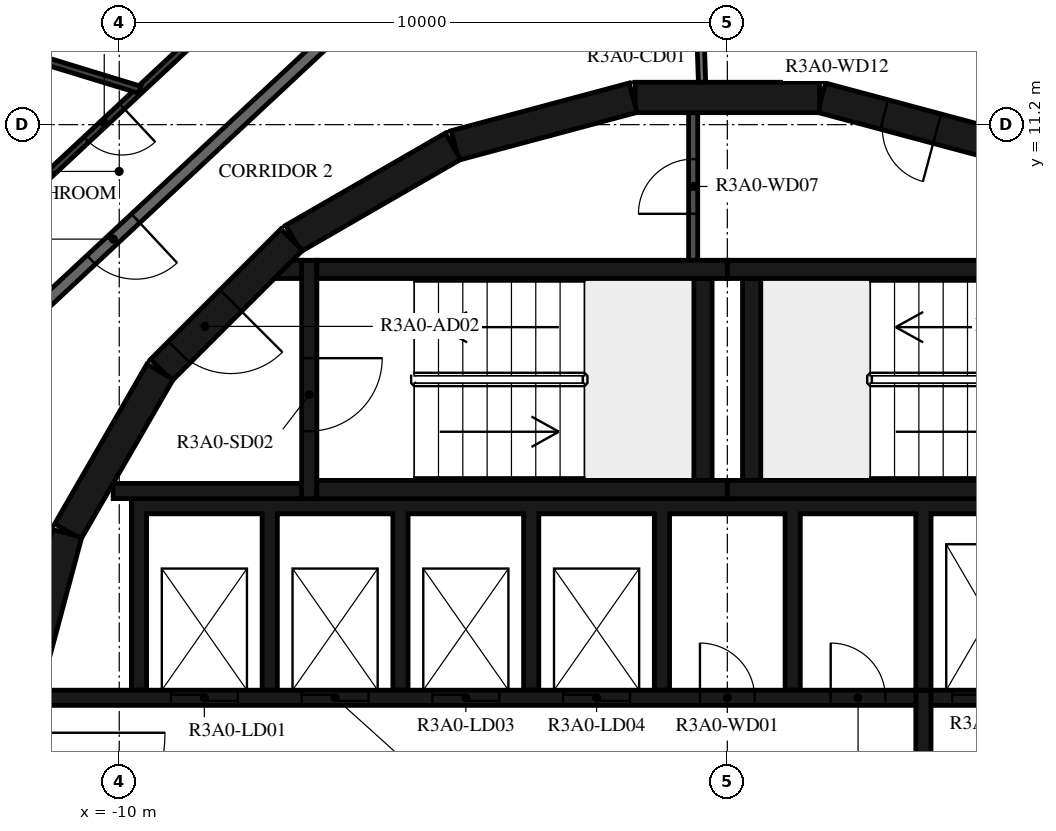
"""IFC4 building model, lengths in metres.
Left out: names, types, materials, properties, quantities, classifications, styles, units other than length and angle.
Written with IfcOpenShell. Run it as: python <this file> out.ifc"""

import sys

from ifc_helpers import new_model, si_unit, direction, frame, frame_2d, origin, place, context, subcontext, project, spatial, polyline, rectangle, outline, extrude, element, fill, save


model = new_model("IFC4")
c1 = context("Model", 3, precision=1e-05, world=origin(), true_north=direction((0.0, 1.0)))
c2 = subcontext(c1, "Body", "Model", "MODEL_VIEW")
j1 = project(units=[si_unit("LENGTHUNIT", "METRE"), si_unit("PLANEANGLEUNIT", "RADIAN")], contexts=[c1])
p1 = place(None, origin())
s1 = spatial("IfcSite", under=j1, at=p1, CompositionType="ELEMENT")
p2 = place(p1, origin())
s2 = spatial("IfcBuilding", under=s1, at=p2, CompositionType="ELEMENT")
p3 = place(p2, frame((0.0, 0.0, 120.4)))
s3 = spatial("IfcBuildingStorey", under=s2, at=p3, CompositionType="ELEMENT", Elevation=120.4)
p4 = place(p3, frame((4.479, 10.858, 0.0), z_axis=(0.0, 0.0, 1.0), x_axis=(-0.965948410781, 0.258734743916, 0.0)))
e1 = element("IfcWall", 1, at=p4, inside=s3, PredefinedType="SHEAR", context=c2, shape_type="SweptSolid", body=[
    extrude(rectangle(XDim=3.033, YDim=0.5, at=frame_2d((1.516, 0.0))), origin(), (0.0, 0.0, 1.0), 3.12),
])
p5 = place(p4, frame((1.066, 0.0, 0.0)))
e2 = element("IfcOpeningElement", 2, at=p5, cuts=e1, PredefinedType="OPENING", context=c2, shape_type="SweptSolid", body=[
    extrude(rectangle(XDim=0.9, YDim=2.1, at=frame_2d((0.45, 1.05))), frame((0.0, 0.26, 0.0), z_axis=(0.0, -1.0, 0.0), x_axis=(1.0, 0.0, 0.0)), (0.0, 0.0, 1.0), 0.52),
])
for number, where, z_axis, x_axis in (
    (3, (1.516, 11.647, 0.0), (0.0, 0.0, 1.0), (-1.0, 0.0, 0.0)),
    (4, (-1.55, 11.643, 0.0), (0.0, 0.0, 1.0), (-0.966, -0.259, 0.0)),
    (5, (-4.51, 10.845, 0.0), (0.0, 0.0, 1.0), (-0.866, -0.5, 0.0)),
):
    element("IfcWall", number, at=place(p3, frame(where, z_axis=z_axis, x_axis=x_axis)), inside=s3, PredefinedType="SHEAR", context=c2, shape_type="SweptSolid", body=[
        extrude(rectangle(XDim=3.033, YDim=0.5, at=frame_2d((1.516, 0.0))), origin(), (0.0, 0.0, 1.0), 3.12),
    ])
p6 = place(p3, frame((-7.164, 9.308, 0.0), z_axis=(0.0, 0.0, 1.0), x_axis=(-0.707106781187, -0.707106781187, 0.0)))
e6 = element("IfcWall", 6, at=p6, inside=s3, PredefinedType="SHEAR", context=c2, shape_type="SweptSolid", body=[
    extrude(rectangle(XDim=3.032, YDim=0.5, at=frame_2d((1.516, 0.0))), origin(), (0.0, 0.0, 1.0), 3.12),
])
p7 = place(p6, frame((1.416, 0.0, 0.0)))
e7 = element("IfcOpeningElement", 7, at=p7, cuts=e6, PredefinedType="OPENING", context=c2, shape_type="SweptSolid", body=[
    extrude(rectangle(XDim=1.2, YDim=2.1, at=frame_2d((0.6, 1.05))), frame((0.0, 0.26, 0.0), z_axis=(0.0, -1.0, 0.0), x_axis=(1.0, 0.0, 0.0)), (0.0, 0.0, 1.0), 0.52),
])
for number, where, z_axis, x_axis in (
    (8, (-9.329, 7.137, 0.0), (0.0, 0.0, 1.0), (-0.5, -0.866, 0.0)),
    (9, (-10.858, 4.479, 0.0), (0.0, 0.0, 1.0), (-0.259, -0.966, 0.0)),
):
    element("IfcWall", number, at=place(p3, frame(where, z_axis=z_axis, x_axis=x_axis)), inside=s3, PredefinedType="SHEAR", context=c2, shape_type="SweptSolid", body=[
        extrude(rectangle(XDim=3.033, YDim=0.5, at=frame_2d((1.516, 0.0))), origin(), (0.0, 0.0, 1.0), 3.12),
    ])
for number, where, z_axis, x_axis in (
    (10, (0.0, 5.2, 0.0), (0.0, 0.0, 1.0), (1.0, 0.0, 0.0)),
    (11, (0.0, 8.82, 0.0), (0.0, 0.0, 1.0), (1.0, 0.0, 0.0)),
):
    element("IfcWall", number, at=place(p3, frame(where, z_axis=z_axis, x_axis=x_axis)), inside=s3, PredefinedType="SHEAR", context=c2, shape_type="SweptSolid", body=[
        extrude(rectangle(XDim=6.75, YDim=0.3, at=frame_2d((3.375, 0.0))), origin(), (0.0, 0.0, 1.0), 3.12),
    ])
p8 = place(p3, frame((0.4, 5.35, 0.0), z_axis=(0.0, 0.0, 1.0), x_axis=(0.0, 1.0, 0.0)))
e12 = element("IfcWall", 12, at=p8, inside=s3, PredefinedType="SHEAR", context=c2, shape_type="SweptSolid", body=[
    extrude(rectangle(XDim=3.32, YDim=0.3, at=frame_2d((1.66, 0.0))), origin(), (0.0, 0.0, 1.0), 3.12),
])
for number, where, z_axis, x_axis in (
    (13, (-6.75, 5.2, 0.0), (0.0, 0.0, 1.0), (1.0, 0.0, 0.0)),
    (14, (-6.75, 8.82, 0.0), (0.0, 0.0, 1.0), (1.0, 0.0, 0.0)),
):
    element("IfcWall", number, at=place(p3, frame(where, z_axis=z_axis, x_axis=x_axis)), inside=s3, PredefinedType="SHEAR", context=c2, shape_type="SweptSolid", body=[
        extrude(rectangle(XDim=6.75, YDim=0.3, at=frame_2d((3.375, 0.0))), origin(), (0.0, 0.0, 1.0), 3.12),
    ])
p9 = place(p3, frame((-0.4, 5.35, 0.0), z_axis=(0.0, 0.0, 1.0), x_axis=(0.0, 1.0, 0.0)))
e15 = element("IfcWall", 15, at=p9, inside=s3, PredefinedType="SHEAR", context=c2, shape_type="SweptSolid", body=[
    extrude(rectangle(XDim=3.32, YDim=0.3, at=frame_2d((1.66, 0.0))), origin(), (0.0, 0.0, 1.0), 3.12),
])
p10 = place(p3, frame((-6.875, 8.97, 0.0), z_axis=(0.0, 0.0, 1.0), x_axis=(0.0, -1.0, 0.0)))
e16 = element("IfcWall", 16, at=p10, inside=s3, PredefinedType="SHEAR", context=c2, shape_type="SweptSolid", body=[
    extrude(rectangle(XDim=3.92, YDim=0.25, at=frame_2d((1.96, 0.0))), origin(), (0.0, 0.0, 1.0), 3.12),
])
p11 = place(p10, frame((1.61, 0.0, 0.0)))
e17 = element("IfcOpeningElement", 17, at=p11, cuts=e16, PredefinedType="OPENING", context=c2, shape_type="SweptSolid", body=[
    extrude(rectangle(XDim=1.2, YDim=2.1, at=frame_2d((0.6, 1.05))), frame((0.0, 0.135, 0.0), z_axis=(0.0, -1.0, 0.0), x_axis=(1.0, 0.0, 0.0)), (0.0, 0.0, 1.0), 0.27),
])
p12 = place(p3, frame((-7.0, 5.175, 0.0), z_axis=(0.0, 0.0, 1.0), x_axis=(-1.0, 0.0, 0.0)))
e18 = element("IfcWall", 18, at=p12, inside=s3, PredefinedType="SHEAR", context=c2, shape_type="SweptSolid", body=[
    extrude(rectangle(XDim=3.1, YDim=0.25, at=frame_2d((1.55, 0.0))), origin(), (0.0, 0.0, 1.0), 3.12),
])
p13 = place(p3, origin())
e19 = element("IfcWall", 19, at=p13, inside=s3, PredefinedType="SHEAR", context=c2, shape_type="SweptSolid", body=[
    extrude(outline(polyline([(-7.148, 8.97), (-7.0, 8.97), (-7.0, 8.67), (-7.448, 8.67), (-7.148, 8.97)])), origin(), (0.0, 0.0, 1.0), 3.12),
])
p14 = place(p3, origin())
e20 = element("IfcWall", 20, at=p14, inside=s3, PredefinedType="SHEAR", context=c2, shape_type="SweptSolid", body=[
    extrude(outline(polyline([(-9.55, 4.8), (-7.65, 4.8), (-7.65, 1.9), (-7.4, 1.9), (-7.4, 4.8), (-5.5, 4.8), (-5.5, 1.9), (-5.25, 1.9), (-5.25, 4.8), (-3.35, 4.8), (-3.35, 1.9), (-3.1, 1.9), (-3.1, 4.8), (-1.2, 4.8), (-1.2, 1.9), (-0.95, 1.9), (-0.95, 4.8), (0.95, 4.8), (0.95, 1.9), (1.2, 1.9), (1.2, 4.8), (3.1, 4.8), (3.1, 1.9), (3.35, 1.9), (3.35, 4.8), (5.25, 4.8), (5.25, 1.9), (5.5, 1.9), (5.5, 4.8), (7.4, 4.8), (7.4, 1.9), (7.65, 1.9), (7.65, 4.8), (9.55, 4.8), (9.55, 1.9), (9.8, 1.9), (9.8, 4.8), (9.8, 5.05), (-9.8, 5.05), (-9.8, 4.8), (-9.8, 1.9), (-9.55, 1.9), (-9.55, 4.8)])), origin(), (0.0, 0.0, 1.0), 3.12),
])
p15 = place(p3, frame((-11.28, 1.775, 0.0), z_axis=(0.0, 0.0, 1.0), x_axis=(1.0, 0.0, 0.0)))
e21 = element("IfcWall", 21, at=p15, inside=s3, PredefinedType="SHEAR", context=c2, shape_type="SweptSolid", body=[
    extrude(rectangle(XDim=14.38, YDim=0.25, at=frame_2d((7.19, 0.0))), origin(), (0.0, 0.0, 1.0), 3.12),
])
p16 = place(p15, frame((2.13, 0.0, 0.0)))
e22 = element("IfcOpeningElement", 22, at=p16, cuts=e21, PredefinedType="OPENING", context=c2, shape_type="SweptSolid", body=[
    extrude(rectangle(XDim=1.1, YDim=2.1, at=frame_2d((0.55, 1.05))), frame((0.0, 0.135, 0.0), z_axis=(0.0, -1.0, 0.0), x_axis=(1.0, 0.0, 0.0)), (0.0, 0.0, 1.0), 0.27),
])
p17 = place(p15, frame((4.28, 0.0, 0.0)))
e23 = element("IfcOpeningElement", 23, at=p17, cuts=e21, PredefinedType="OPENING", context=c2, shape_type="SweptSolid", body=[
    extrude(rectangle(XDim=1.1, YDim=2.1, at=frame_2d((0.55, 1.05))), frame((0.0, 0.135, 0.0), z_axis=(0.0, -1.0, 0.0), x_axis=(1.0, 0.0, 0.0)), (0.0, 0.0, 1.0), 0.27),
])
p18 = place(p15, frame((6.43, 0.0, 0.0)))
e24 = element("IfcOpeningElement", 24, at=p18, cuts=e21, PredefinedType="OPENING", context=c2, shape_type="SweptSolid", body=[
    extrude(rectangle(XDim=1.1, YDim=2.1, at=frame_2d((0.55, 1.05))), frame((0.0, 0.135, 0.0), z_axis=(0.0, -1.0, 0.0), x_axis=(1.0, 0.0, 0.0)), (0.0, 0.0, 1.0), 0.27),
])
p19 = place(p15, frame((8.58, 0.0, 0.0)))
e25 = element("IfcOpeningElement", 25, at=p19, cuts=e21, PredefinedType="OPENING", context=c2, shape_type="SweptSolid", body=[
    extrude(rectangle(XDim=1.1, YDim=2.1, at=frame_2d((0.55, 1.05))), frame((0.0, 0.135, 0.0), z_axis=(0.0, -1.0, 0.0), x_axis=(1.0, 0.0, 0.0)), (0.0, 0.0, 1.0), 0.27),
])
p20 = place(p15, frame((10.83, 0.0, 0.0)))
e26 = element("IfcOpeningElement", 26, at=p20, cuts=e21, PredefinedType="OPENING", context=c2, shape_type="SweptSolid", body=[
    extrude(rectangle(XDim=0.9, YDim=2.1, at=frame_2d((0.45, 1.05))), frame((0.0, 0.135, 0.0), z_axis=(0.0, -1.0, 0.0), x_axis=(1.0, 0.0, 0.0)), (0.0, 0.0, 1.0), 0.27),
])
p21 = place(p15, frame((12.98, 0.0, 0.0)))
e27 = element("IfcOpeningElement", 27, at=p21, cuts=e21, PredefinedType="OPENING", context=c2, shape_type="SweptSolid", body=[
    extrude(rectangle(XDim=0.9, YDim=2.1, at=frame_2d((0.45, 1.05))), frame((0.0, 0.135, 0.0), z_axis=(0.0, -1.0, 0.0), x_axis=(1.0, 0.0, 0.0)), (0.0, 0.0, 1.0), 0.27),
])
p22 = place(p3, frame((3.35, 1.775, 0.0), z_axis=(0.0, 0.0, 1.0), x_axis=(1.0, 0.0, 0.0)))
e28 = element("IfcWall", 28, at=p22, inside=s3, PredefinedType="SHEAR", context=c2, shape_type="SweptSolid", body=[
    extrude(rectangle(XDim=7.93, YDim=0.25, at=frame_2d((3.965, 0.0))), origin(), (0.0, 0.0, 1.0), 3.12),
])
p23 = place(p22, frame((0.35, 0.0, 0.0)))
e29 = element("IfcOpeningElement", 29, at=p23, cuts=e28, PredefinedType="OPENING", context=c2, shape_type="SweptSolid", body=[
    extrude(rectangle(XDim=1.2, YDim=2.4, at=frame_2d((0.6, 1.2))), frame((0.0, 0.135, 0.0), z_axis=(0.0, -1.0, 0.0), x_axis=(1.0, 0.0, 0.0)), (0.0, 0.0, 1.0), 0.27),
])
p24 = place(p22, frame((2.5, 0.0, 0.0)))
e30 = element("IfcOpeningElement", 30, at=p24, cuts=e28, PredefinedType="OPENING", context=c2, shape_type="SweptSolid", body=[
    extrude(rectangle(XDim=1.2, YDim=2.4, at=frame_2d((0.6, 1.2))), frame((0.0, 0.135, 0.0), z_axis=(0.0, -1.0, 0.0), x_axis=(1.0, 0.0, 0.0)), (0.0, 0.0, 1.0), 0.27),
])
p25 = place(p22, frame((4.8, 0.0, 0.0)))
e31 = element("IfcOpeningElement", 31, at=p25, cuts=e28, PredefinedType="OPENING", context=c2, shape_type="SweptSolid", body=[
    extrude(rectangle(XDim=0.9, YDim=2.1, at=frame_2d((0.45, 1.05))), frame((0.0, 0.135, 0.0), z_axis=(0.0, -1.0, 0.0), x_axis=(1.0, 0.0, 0.0)), (0.0, 0.0, 1.0), 0.27),
])
p26 = place(p3, frame((3.225, -1.9, 0.0), z_axis=(0.0, 0.0, 1.0), x_axis=(0.0, 1.0, 0.0)))
e32 = element("IfcWall", 32, at=p26, inside=s3, PredefinedType="SHEAR", context=c2, shape_type="SweptSolid", body=[
    extrude(rectangle(XDim=3.8, YDim=0.25, at=frame_2d((1.9, 0.0))), origin(), (0.0, 0.0, 1.0), 3.12),
])
p27 = place(p3, frame((-0.562, 8.97, 0.0), z_axis=(0.0, 0.0, 1.0), x_axis=(0.0, 1.0, 0.0)))
e33 = element("IfcWall", 33, at=p27, inside=s3, PredefinedType="PARTITIONING", context=c2, shape_type="SweptSolid", body=[
    extrude(rectangle(XDim=2.427, YDim=0.15, at=frame_2d((1.214, 0.0))), origin(), (0.0, 0.0, 1.0), 3.12),
])
p28 = place(p27, frame((0.764, 0.0, 0.0)))
e34 = element("IfcOpeningElement", 34, at=p28, cuts=e33, PredefinedType="OPENING", context=c2, shape_type="SweptSolid", body=[
    extrude(rectangle(XDim=0.9, YDim=2.1, at=frame_2d((0.45, 1.05))), frame((0.0, 0.085, 0.0), z_axis=(0.0, -1.0, 0.0), x_axis=(1.0, 0.0, 0.0)), (0.0, 0.0, 1.0), 0.17),
])
p29 = place(p3, frame((-0.487, 13.948, 0.0), z_axis=(0.0, 0.0, 1.0), x_axis=(0.034859752231, -0.999392214135, 0.0)))
e35 = element("IfcWall", 35, at=p29, inside=s3, PredefinedType="PARTITIONING", context=c2, shape_type="SweptSolid", body=[
    extrude(rectangle(XDim=2.052, YDim=0.12, at=frame_2d((1.026, 0.0))), origin(), (0.0, 0.0, 1.0), 3.12),
])
p30 = place(p29, frame((0.125, 0.0, 0.0)))
e36 = element("IfcOpeningElement", 36, at=p30, cuts=e35, PredefinedType="OPENING", context=c2, shape_type="SweptSolid", body=[
    extrude(rectangle(XDim=1.2, YDim=2.1, at=frame_2d((0.6, 1.05))), frame((0.0, 0.07, 0.0), z_axis=(0.0, -1.0, 0.0), x_axis=(1.0, 0.0, 0.0)), (0.0, 0.0, 1.0), 0.14),
])
p31 = place(p3, frame((7.516, 12.028, 0.0), z_axis=(0.0, 0.0, 1.0), x_axis=(-0.956306642771, 0.292365533182, 0.0)))
e37 = element("IfcWall", 37, at=p31, inside=s3, PredefinedType="STANDARD", context=c2, shape_type="SweptSolid", body=[
    extrude(rectangle(XDim=7.342, YDim=0.2, at=frame_2d((3.671, 0.0))), origin(), (0.0, 0.0, 1.0), 3.12),
])
p32 = place(p3, frame((-6.659, 12.523, 0.0), z_axis=(0.0, 0.0, 1.0), x_axis=(-0.731350455479, -0.682001841105, 0.0)))
e38 = element("IfcWall", 38, at=p32, inside=s3, PredefinedType="STANDARD", context=c2, shape_type="SweptSolid", body=[
    extrude(rectangle(XDim=7.342, YDim=0.2, at=frame_2d((3.671, 0.0))), origin(), (0.0, 0.0, 1.0), 3.12),
])
p33 = place(p32, frame((4.2, 0.0, 0.0)))
e39 = element("IfcOpeningElement", 39, at=p33, cuts=e38, PredefinedType="OPENING", context=c2, shape_type="SweptSolid", body=[
    extrude(rectangle(XDim=1.0, YDim=2.1, at=frame_2d((0.5, 1.05))), frame((0.0, 0.11, 0.0), z_axis=(0.0, -1.0, 0.0), x_axis=(1.0, 0.0, 0.0)), (0.0, 0.0, 1.0), 0.22),
])
p34 = place(p3, frame((-1.539, 24.071, 0.0), z_axis=(0.0, 0.0, 1.0), x_axis=(0.68200220595, -0.731350115252, 0.0)))
e40 = element("IfcWall", 40, at=p34, inside=s3, PredefinedType="PARTITIONING", context=c2, shape_type="SweptSolid", body=[
    extrude(rectangle(XDim=17.316, YDim=0.12, at=frame_2d((8.658, 0.0))), origin(), (0.0, 0.0, 1.0), 3.12),
])
p35 = place(p34, frame((3.323, 0.0, 0.0)))
e41 = element("IfcOpeningElement", 41, at=p35, cuts=e40, PredefinedType="OPENING", context=c2, shape_type="SweptSolid", body=[
    extrude(rectangle(XDim=0.9, YDim=2.1, at=frame_2d((0.45, 1.05))), frame((0.0, 0.07, 0.0), z_axis=(0.0, -1.0, 0.0), x_axis=(1.0, 0.0, 0.0)), (0.0, 0.0, 1.0), 0.14),
])
p36 = place(p34, frame((1.417, 0.0, 0.0)))
e42 = element("IfcOpeningElement", 42, at=p36, cuts=e40, PredefinedType="OPENING", context=c2, shape_type="SweptSolid", body=[
    extrude(rectangle(XDim=0.9, YDim=2.1, at=frame_2d((0.45, 1.05))), frame((0.0, 0.07, 0.0), z_axis=(0.0, -1.0, 0.0), x_axis=(1.0, 0.0, 0.0)), (0.0, 0.0, 1.0), 0.14),
])
p37 = place(p3, frame((-7.388, 13.894, 0.0), z_axis=(0.0, 0.0, 1.0), x_axis=(-0.731357186721, -0.681994622729, 0.0)))
e43 = element("IfcWall", 43, at=p37, inside=s3, PredefinedType="PARTITIONING", context=c2, shape_type="SweptSolid", body=[
    extrude(rectangle(XDim=8.146, YDim=0.12, at=frame_2d((4.073, 0.0))), origin(), (0.0, 0.0, 1.0), 3.12),
])
p38 = place(p37, frame((3.509, 0.0, 0.0)))
e44 = element("IfcOpeningElement", 44, at=p38, cuts=e43, PredefinedType="OPENING", context=c2, shape_type="SweptSolid", body=[
    extrude(rectangle(XDim=0.8, YDim=2.1, at=frame_2d((0.4, 1.05))), frame((0.0, 0.07, 0.0), z_axis=(0.0, -1.0, 0.0), x_axis=(1.0, 0.0, 0.0)), (0.0, 0.0, 1.0), 0.14),
])
p39 = place(p3, frame((-9.169, 22.31, 0.0), z_axis=(0.0, 0.0, 1.0), x_axis=(-0.29236145486, -0.956307889601, 0.0)))
e45 = element("IfcWall", 45, at=p39, inside=s3, PredefinedType="PARTITIONING", context=c2, shape_type="SweptSolid", body=[
    extrude(rectangle(XDim=17.316, YDim=0.12, at=frame_2d((8.658, 0.0))), origin(), (0.0, 0.0, 1.0), 3.12),
])
p40 = place(p39, frame((3.683, 0.0, 0.0)))
e46 = element("IfcOpeningElement", 46, at=p40, cuts=e45, PredefinedType="OPENING", context=c2, shape_type="SweptSolid", body=[
    extrude(rectangle(XDim=0.9, YDim=2.1, at=frame_2d((0.45, 1.05))), frame((0.0, 0.07, 0.0), z_axis=(0.0, -1.0, 0.0), x_axis=(1.0, 0.0, 0.0)), (0.0, 0.0, 1.0), 0.14),
])
p41 = place(p3, frame((-12.157, 12.537, 0.0), z_axis=(0.0, 0.0, 1.0), x_axis=(0.956293441844, -0.292408708979, 0.0)))
e47 = element("IfcWall", 47, at=p41, inside=s3, PredefinedType="PARTITIONING", context=c2, shape_type="SweptSolid", body=[
    extrude(rectangle(XDim=2.609, YDim=0.12, at=frame_2d((1.305, 0.0))), origin(), (0.0, 0.0, 1.0), 3.12),
])
p42 = place(p11, origin())
e48 = element("IfcDoor", 48, at=p42, inside=s3, OperationType="SINGLE_SWING_LEFT", PredefinedType="DOOR", context=c2, shape_type="SweptSolid", body=[
    extrude(rectangle(XDim=1.2, YDim=2.1, at=frame_2d((0.6, 1.05))), frame((0.0, 0.025, 0.0), z_axis=(0.0, -1.0, 0.0), x_axis=(1.0, 0.0, 0.0)), (0.0, 0.0, 1.0), 0.05),
])
fill(e17, e48)
p43 = place(p7, origin())
e49 = element("IfcDoor", 49, at=p43, inside=s3, OperationType="SINGLE_SWING_RIGHT", PredefinedType="DOOR", context=c2, shape_type="SweptSolid", body=[
    extrude(rectangle(XDim=1.2, YDim=2.1, at=frame_2d((0.6, 1.05))), frame((0.0, 0.025, 0.0), z_axis=(0.0, -1.0, 0.0), x_axis=(1.0, 0.0, 0.0)), (0.0, 0.0, 1.0), 0.05),
])
fill(e7, e49)
p44 = place(p16, origin())
e50 = element("IfcDoor", 50, at=p44, inside=s3, OperationType="DOUBLE_DOOR_SLIDING", PredefinedType="DOOR", context=c2, shape_type="SweptSolid", body=[
    extrude(rectangle(XDim=1.1, YDim=2.1, at=frame_2d((0.55, 1.05))), frame((0.0, 0.025, 0.0), z_axis=(0.0, -1.0, 0.0), x_axis=(1.0, 0.0, 0.0)), (0.0, 0.0, 1.0), 0.05),
])
fill(e22, e50)
p45 = place(p17, origin())
e51 = element("IfcDoor", 51, at=p45, inside=s3, OperationType="DOUBLE_DOOR_SLIDING", PredefinedType="DOOR", context=c2, shape_type="SweptSolid", body=[
    extrude(rectangle(XDim=1.1, YDim=2.1, at=frame_2d((0.55, 1.05))), frame((0.0, 0.025, 0.0), z_axis=(0.0, -1.0, 0.0), x_axis=(1.0, 0.0, 0.0)), (0.0, 0.0, 1.0), 0.05),
])
fill(e23, e51)
p46 = place(p18, origin())
e52 = element("IfcDoor", 52, at=p46, inside=s3, OperationType="DOUBLE_DOOR_SLIDING", PredefinedType="DOOR", context=c2, shape_type="SweptSolid", body=[
    extrude(rectangle(XDim=1.1, YDim=2.1, at=frame_2d((0.55, 1.05))), frame((0.0, 0.025, 0.0), z_axis=(0.0, -1.0, 0.0), x_axis=(1.0, 0.0, 0.0)), (0.0, 0.0, 1.0), 0.05),
])
fill(e24, e52)
p47 = place(p19, origin())
e53 = element("IfcDoor", 53, at=p47, inside=s3, OperationType="DOUBLE_DOOR_SLIDING", PredefinedType="DOOR", context=c2, shape_type="SweptSolid", body=[
    extrude(rectangle(XDim=1.1, YDim=2.1, at=frame_2d((0.55, 1.05))), frame((0.0, 0.025, 0.0), z_axis=(0.0, -1.0, 0.0), x_axis=(1.0, 0.0, 0.0)), (0.0, 0.0, 1.0), 0.05),
])
fill(e25, e53)
p48 = place(p23, origin())
e54 = element("IfcDoor", 54, at=p48, inside=s3, OperationType="DOUBLE_DOOR_SLIDING", PredefinedType="DOOR", context=c2, shape_type="SweptSolid", body=[
    extrude(rectangle(XDim=1.2, YDim=2.4, at=frame_2d((0.6, 1.2))), frame((0.0, 0.025, 0.0), z_axis=(0.0, -1.0, 0.0), x_axis=(1.0, 0.0, 0.0)), (0.0, 0.0, 1.0), 0.05),
])
fill(e29, e54)
p49 = place(p20, origin())
e55 = element("IfcDoor", 55, at=p49, inside=s3, OperationType="SINGLE_SWING_RIGHT", PredefinedType="DOOR", context=c2, shape_type="SweptSolid", body=[
    extrude(rectangle(XDim=0.9, YDim=2.1, at=frame_2d((0.45, 1.05))), frame((0.0, 0.025, 0.0), z_axis=(0.0, -1.0, 0.0), x_axis=(1.0, 0.0, 0.0)), (0.0, 0.0, 1.0), 0.05),
])
fill(e26, e55)
p50 = place(p21, origin())
e56 = element("IfcDoor", 56, at=p50, inside=s3, OperationType="SINGLE_SWING_LEFT", PredefinedType="DOOR", context=c2, shape_type="SweptSolid", body=[
    extrude(rectangle(XDim=0.9, YDim=2.1, at=frame_2d((0.45, 1.05))), frame((0.0, 0.025, 0.0), z_axis=(0.0, -1.0, 0.0), x_axis=(1.0, 0.0, 0.0)), (0.0, 0.0, 1.0), 0.05),
])
fill(e27, e56)
p51 = place(p28, origin())
e57 = element("IfcDoor", 57, at=p51, inside=s3, OperationType="SINGLE_SWING_RIGHT", PredefinedType="DOOR", context=c2, shape_type="SweptSolid", body=[
    extrude(rectangle(XDim=0.9, YDim=2.1, at=frame_2d((0.45, 1.05))), frame((0.0, 0.025, 0.0), z_axis=(0.0, -1.0, 0.0), x_axis=(1.0, 0.0, 0.0)), (0.0, 0.0, 1.0), 0.05),
])
fill(e34, e57)
p52 = place(p5, origin())
e58 = element("IfcDoor", 58, at=p52, inside=s3, OperationType="SINGLE_SWING_LEFT", PredefinedType="DOOR", context=c2, shape_type="SweptSolid", body=[
    extrude(rectangle(XDim=0.9, YDim=2.1, at=frame_2d((0.45, 1.05))), frame((0.0, 0.025, 0.0), z_axis=(0.0, -1.0, 0.0), x_axis=(1.0, 0.0, 0.0)), (0.0, 0.0, 1.0), 0.05),
])
fill(e2, e58)
p53 = place(p33, origin())
e59 = element("IfcDoor", 59, at=p53, inside=s3, OperationType="SINGLE_SWING_LEFT", PredefinedType="DOOR", context=c2, shape_type="SweptSolid", body=[
    extrude(rectangle(XDim=1.0, YDim=2.1, at=frame_2d((0.5, 1.05))), frame((0.0, 0.025, 0.0), z_axis=(0.0, -1.0, 0.0), x_axis=(1.0, 0.0, 0.0)), (0.0, 0.0, 1.0), 0.05),
])
fill(e39, e59)
p54 = place(p38, origin())
e60 = element("IfcDoor", 60, at=p54, inside=s3, OperationType="SINGLE_SWING_LEFT", PredefinedType="DOOR", context=c2, shape_type="SweptSolid", body=[
    extrude(rectangle(XDim=0.8, YDim=2.1, at=frame_2d((0.4, 1.05))), frame((0.0, 0.025, 0.0), z_axis=(0.0, -1.0, 0.0), x_axis=(1.0, 0.0, 0.0)), (0.0, 0.0, 1.0), 0.05),
])
fill(e44, e60)
save(model, sys.argv[1])
